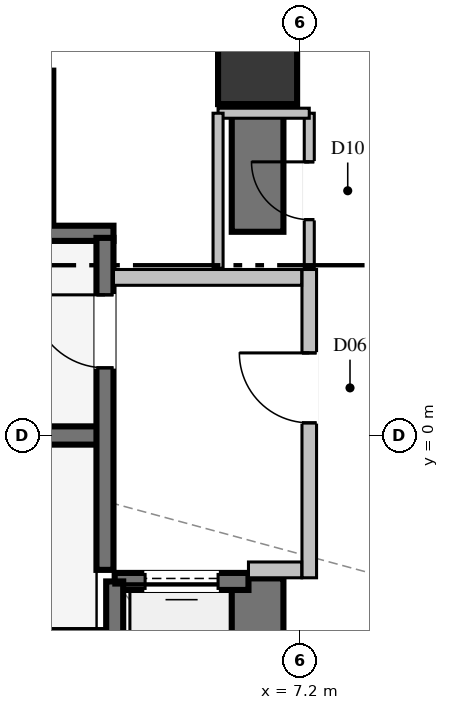
"""IFC4 building model, lengths in metres.
Left out: names, types, materials, properties, quantities, classifications, styles, units other than length and angle.
Written with IfcOpenShell. Run it as: python <this file> out.ifc"""

import sys

from ifc_helpers import new_model, si_unit, direction, frame, frame_2d, origin, origin_2d, place, context, subcontext, project, spatial, rectangle, extrude, element, fill, save


model = new_model("IFC4")
c1 = context("Model", 3, precision=1e-05, world=origin(), true_north=direction((0.0, 1.0)))
c2 = subcontext(c1, "Body", "Model", "MODEL_VIEW")
j1 = project(units=[si_unit("LENGTHUNIT", "METRE"), si_unit("PLANEANGLEUNIT", "RADIAN")], contexts=[c1])
p1 = place(None, origin())
s1 = spatial("IfcSite", under=j1, at=p1, CompositionType="ELEMENT")
p2 = place(p1, origin())
s2 = spatial("IfcBuilding", under=s1, at=p2, CompositionType="ELEMENT")
p3 = place(p2, origin())
s3 = spatial("IfcBuildingStorey", under=s2, at=p3, CompositionType="ELEMENT", Elevation=0.0)
p4 = place(p3, frame((6.5, 6.1, 0.0), z_axis=(0.0, 0.0, 1.0), x_axis=(1.0, 0.0, 0.0)))
e1 = element("IfcColumn", 1, at=p4, inside=s3, PredefinedType="COLUMN", context=c2, shape_type="SweptSolid", body=[
    extrude(rectangle(XDim=1.3, YDim=1.3, at=origin_2d()), origin(), (0.0, 0.0, 1.0), 7.2),
])
p5 = place(p3, frame((-3.99, 0.0, 0.0), z_axis=(0.0, 0.0, 1.0), x_axis=(1.0, 0.0, 0.0)))
e2 = element("IfcWall", 2, at=p5, inside=s3, PredefinedType="SHEAR", context=c2, shape_type="SweptSolid", body=[
    extrude(rectangle(XDim=7.98, YDim=0.3, at=frame_2d((3.99, 0.0))), origin(), (0.0, 0.0, 1.0), 7.2),
])
for number, where, z_axis, x_axis in (
    (3, (-4.13, -3.325, 0.0), (0.0, 0.0, 1.0), (1.0, 0.0, 0.0)),
    (4, (-4.13, 3.325, 0.0), (0.0, 0.0, 1.0), (1.0, 0.0, 0.0)),
):
    element("IfcWall", number, at=place(p3, frame(where, z_axis=z_axis, x_axis=x_axis)), inside=s3, PredefinedType="SOLIDWALL", context=c2, shape_type="SweptSolid", body=[
        extrude(rectangle(XDim=8.26, YDim=0.25, at=frame_2d((4.13, 0.0))), origin(), (0.0, 0.0, 1.0), 7.2),
    ])
p6 = place(p3, frame((5.85, 6.1, 0.0), z_axis=(0.0, 0.0, 1.0), x_axis=(1.0, 0.0, 0.0)))
e5 = element("IfcWall", 5, at=p6, inside=s3, PredefinedType="SHEAR", context=c2, shape_type="SweptSolid", body=[
    extrude(rectangle(XDim=0.225, YDim=0.85, at=frame_2d((0.112, 0.0))), origin(), (0.0, 0.0, 1.0), 7.2),
])
p7 = place(p3, frame((6.5, -6.525, 0.0), z_axis=(0.0, 0.0, 1.0), x_axis=(0.0, 1.0, 0.0)))
e6 = element("IfcWall", 6, at=p7, inside=s3, PredefinedType="SHEAR", context=c2, shape_type="SweptSolid", body=[
    extrude(rectangle(XDim=4.175, YDim=0.85, at=frame_2d((2.087, 0.0))), origin(), (0.0, 0.0, 1.0), 7.2),
])
p8 = place(p3, frame((6.5, 3.35, 0.0), z_axis=(0.0, 0.0, 1.0), x_axis=(0.0, 1.0, 0.0)))
e7 = element("IfcWall", 7, at=p8, inside=s3, PredefinedType="SHEAR", context=c2, shape_type="SweptSolid", body=[
    extrude(rectangle(XDim=3.175, YDim=0.85, at=frame_2d((1.587, 0.0))), origin(), (0.0, 0.0, 1.0), 7.2),
])
p9 = place(p3, frame((3.0, 3.5, 0.0), z_axis=(0.0, 0.0, 1.0), x_axis=(0.0, 1.0, 0.0)))
e8 = element("IfcWall", 8, at=p9, inside=s3, PredefinedType="SOLIDWALL", context=c2, shape_type="SweptSolid", body=[
    extrude(rectangle(XDim=2.5, YDim=0.28, at=frame_2d((1.25, 0.0))), origin(), (0.0, 0.0, 1.0), 6.84),
])
p10 = place(p3, frame((6.35, -2.4, 0.0), z_axis=(0.0, 0.0, 1.0), x_axis=(-1.0, 0.0, 0.0)))
e9 = element("IfcWall", 9, at=p10, inside=s3, PredefinedType="SOLIDWALL", context=c2, shape_type="SweptSolid", body=[
    extrude(rectangle(XDim=2.2, YDim=0.28, at=frame_2d((1.1, 0.0))), origin(), (0.0, 0.0, 1.0), 6.84),
])
p11 = place(p10, frame((0.5, 0.0, 0.0)))
e10 = element("IfcOpeningElement", 10, at=p11, cuts=e9, PredefinedType="OPENING", context=c2, shape_type="SweptSolid", body=[
    extrude(rectangle(XDim=1.2, YDim=2.2, at=frame_2d((0.6, 1.1))), frame((0.0, 0.15, 0.0), z_axis=(0.0, -1.0, 0.0), x_axis=(1.0, 0.0, 0.0)), (0.0, 0.0, 1.0), 0.3),
])
p12 = place(p3, frame((4.15, -2.4, 0.0), z_axis=(0.0, 0.0, 1.0), x_axis=(0.0, -1.0, 0.0)))
e11 = element("IfcWall", 11, at=p12, inside=s3, PredefinedType="SOLIDWALL", context=c2, shape_type="SweptSolid", body=[
    extrude(rectangle(XDim=2.7, YDim=0.28, at=frame_2d((1.35, 0.0))), origin(), (0.0, 0.0, 1.0), 6.84),
])
p13 = place(p3, frame((3.99, -2.21, 0.0), z_axis=(0.0, 0.0, 1.0), x_axis=(0.0, 1.0, 0.0)))
e12 = element("IfcWall", 12, at=p13, inside=s3, PredefinedType="SOLIDWALL", context=c2, shape_type="SweptSolid", body=[
    extrude(rectangle(XDim=5.46, YDim=0.28, at=frame_2d((2.73, 0.0))), origin(), (0.0, 0.0, 1.0), 6.84),
])
p14 = place(p13, frame((3.323, 0.0, 0.0)))
e13 = element("IfcOpeningElement", 13, at=p14, cuts=e12, PredefinedType="OPENING", context=c2, shape_type="SweptSolid", body=[
    extrude(rectangle(XDim=1.2, YDim=2.2, at=frame_2d((0.6, 1.1))), frame((0.0, 0.15, 0.0), z_axis=(0.0, -1.0, 0.0), x_axis=(1.0, 0.0, 0.0)), (0.0, 0.0, 1.0), 0.3),
])
p15 = place(p3, frame((7.35, -2.34, 0.0), z_axis=(0.0, 0.0, 1.0), x_axis=(0.0, 1.0, 0.0)))
e14 = element("IfcWall", 14, at=p15, inside=s3, PredefinedType="PARTITIONING", context=c2, shape_type="SweptSolid", body=[
    extrude(rectangle(XDim=5.07, YDim=0.24, at=frame_2d((2.535, 0.0))), origin(), (0.0, 0.0, 1.0), 5.725),
])
p16 = place(p15, frame((2.548, 0.0, 0.0)))
e15 = element("IfcOpeningElement", 15, at=p16, cuts=e14, PredefinedType="OPENING", context=c2, shape_type="SweptSolid", body=[
    extrude(rectangle(XDim=1.15, YDim=2.2, at=frame_2d((0.575, 1.1))), frame((0.0, 0.13, 0.0), z_axis=(0.0, -1.0, 0.0), x_axis=(1.0, 0.0, 0.0)), (0.0, 0.0, 1.0), 0.26),
])
p17 = place(p3, frame((6.35, -2.21, 0.0), z_axis=(0.0, 0.0, 1.0), x_axis=(1.0, 0.0, 0.0)))
e16 = element("IfcWall", 16, at=p17, inside=s3, PredefinedType="PARTITIONING", context=c2, shape_type="SweptSolid", body=[
    extrude(rectangle(XDim=0.875, YDim=0.26, at=frame_2d((0.438, 0.0))), origin(), (0.0, 0.0, 1.0), 6.84),
])
p18 = place(p3, frame((4.13, 2.6, 0.0), z_axis=(0.0, 0.0, 1.0), x_axis=(1.0, 0.0, 0.0)))
e17 = element("IfcWall", 17, at=p18, inside=s3, PredefinedType="PARTITIONING", context=c2, shape_type="SweptSolid", body=[
    extrude(rectangle(XDim=3.095, YDim=0.26, at=frame_2d((1.548, 0.0))), origin(), (0.0, 0.0, 1.0), 6.84),
])
p19 = place(p3, frame((7.35, 2.75, 0.0), z_axis=(0.0, 0.0, 1.0), x_axis=(0.0, 1.0, 0.0)))
e18 = element("IfcWall", 18, at=p19, inside=s3, PredefinedType="PARTITIONING", context=c2, shape_type="SweptSolid", body=[
    extrude(rectangle(XDim=2.55, YDim=0.165, at=frame_2d((1.275, 0.0))), origin(), (0.0, 0.0, 1.0), 5.725),
])
p20 = place(p19, frame((0.8, 0.0, 0.0)))
e19 = element("IfcOpeningElement", 19, at=p20, cuts=e18, PredefinedType="OPENING", context=c2, shape_type="SweptSolid", body=[
    extrude(rectangle(XDim=0.95, YDim=2.1, at=frame_2d((0.475, 1.05))), frame((0.0, 0.093, 0.0), z_axis=(0.0, -1.0, 0.0), x_axis=(1.0, 0.0, 0.0)), (0.0, 0.0, 1.0), 0.185),
])
p21 = place(p3, frame((7.35, 5.3, 0.0), z_axis=(0.0, 0.0, 1.0), x_axis=(-1.0, 0.0, 0.0)))
e20 = element("IfcWall", 20, at=p21, inside=s3, PredefinedType="PARTITIONING", context=c2, shape_type="SweptSolid", body=[
    extrude(rectangle(XDim=1.5, YDim=0.165, at=frame_2d((0.75, 0.0))), origin(), (0.0, 0.0, 1.0), 4.625),
])
p22 = place(p3, frame((5.85, 5.3, 0.0), z_axis=(0.0, 0.0, 1.0), x_axis=(0.0, -1.0, 0.0)))
e21 = element("IfcWall", 21, at=p22, inside=s3, PredefinedType="PARTITIONING", context=c2, shape_type="SweptSolid", body=[
    extrude(rectangle(XDim=2.55, YDim=0.165, at=frame_2d((1.275, 0.0))), origin(), (0.0, 0.0, 1.0), 5.725),
])
p23 = place(p11, origin())
e22 = element("IfcDoor", 22, at=p23, inside=s3, OperationType="SLIDING_TO_LEFT", PredefinedType="DOOR", context=c2, shape_type="SweptSolid", body=[
    extrude(rectangle(XDim=1.2, YDim=2.2, at=frame_2d((0.6, 1.1))), frame((0.0, 0.025, 0.0), z_axis=(0.0, -1.0, 0.0), x_axis=(1.0, 0.0, 0.0)), (0.0, 0.0, 1.0), 0.05),
])
fill(e10, e22)
p24 = place(p14, origin())
e23 = element("IfcDoor", 23, at=p24, inside=s3, OperationType="SINGLE_SWING_RIGHT", PredefinedType="DOOR", context=c2, shape_type="SweptSolid", body=[
    extrude(rectangle(XDim=1.2, YDim=2.2, at=frame_2d((0.6, 1.1))), frame((0.0, 0.025, 0.0), z_axis=(0.0, -1.0, 0.0), x_axis=(1.0, 0.0, 0.0)), (0.0, 0.0, 1.0), 0.05),
])
fill(e13, e23)
p25 = place(p16, origin())
e24 = element("IfcDoor", 24, at=p25, inside=s3, OperationType="SINGLE_SWING_RIGHT", PredefinedType="DOOR", context=c2, shape_type="SweptSolid", body=[
    extrude(rectangle(XDim=1.15, YDim=2.2, at=frame_2d((0.575, 1.1))), frame((0.0, 0.025, 0.0), z_axis=(0.0, -1.0, 0.0), x_axis=(1.0, 0.0, 0.0)), (0.0, 0.0, 1.0), 0.05),
])
fill(e15, e24)
p26 = place(p20, origin())
e25 = element("IfcDoor", 25, at=p26, inside=s3, OperationType="SINGLE_SWING_RIGHT", PredefinedType="DOOR", context=c2, shape_type="SweptSolid", body=[
    extrude(rectangle(XDim=0.95, YDim=2.1, at=frame_2d((0.475, 1.05))), frame((0.0, 0.025, 0.0), z_axis=(0.0, -1.0, 0.0), x_axis=(1.0, 0.0, 0.0)), (0.0, 0.0, 1.0), 0.05),
])
fill(e19, e25)
save(model, sys.argv[1])
